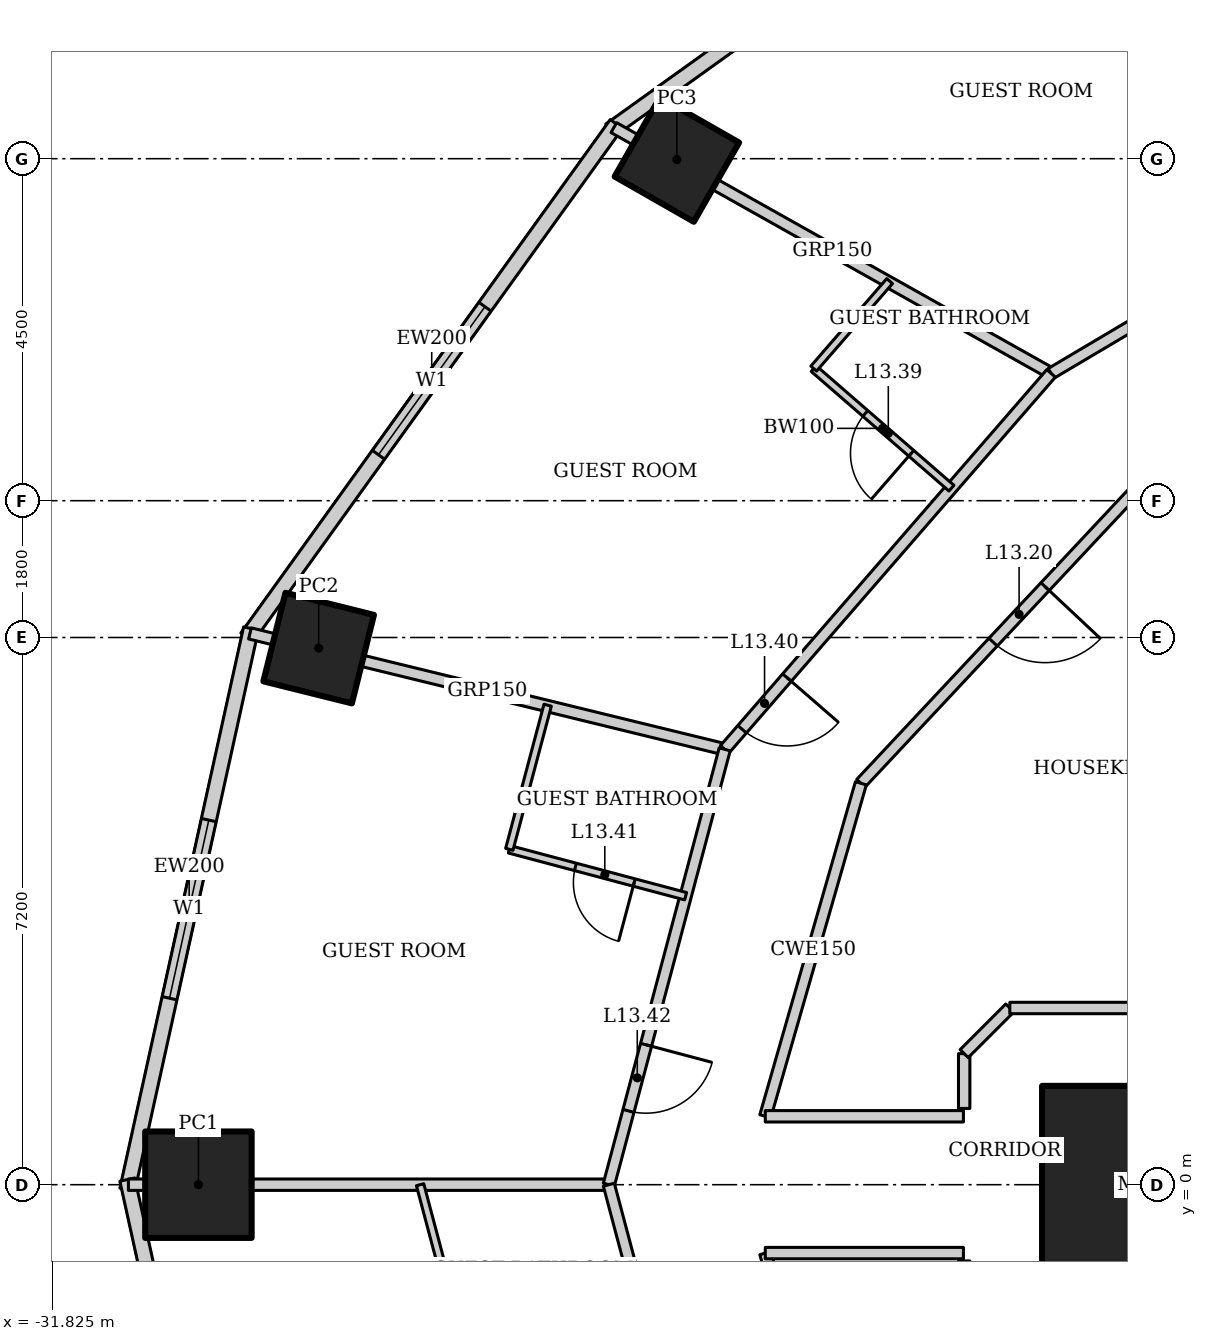
"""IFC4 building model, lengths in metres.
Left out: names, types, materials, properties, quantities, classifications, styles, units other than length and angle.
Written with IfcOpenShell. Run it as: python <this file> out.ifc"""

import sys

from ifc_helpers import new_model, si_unit, direction, frame, frame_2d, origin, origin_2d, place, context, subcontext, project, spatial, rectangle, hollow_rectangle, extrude, element, fill, save


model = new_model("IFC4")
c1 = context("Model", 3, precision=1e-05, world=origin(), true_north=direction((0.0, 1.0)))
c2 = subcontext(c1, "Body", "Model", "MODEL_VIEW")
j1 = project(units=[si_unit("LENGTHUNIT", "METRE"), si_unit("PLANEANGLEUNIT", "RADIAN")], contexts=[c1])
p1 = place(None, origin())
s1 = spatial("IfcSite", under=j1, at=p1, CompositionType="ELEMENT")
p2 = place(p1, origin())
s2 = spatial("IfcBuilding", under=s1, at=p2, CompositionType="ELEMENT")
p3 = place(p2, frame((0.0, 0.0, 62.2)))
s3 = spatial("IfcBuildingStorey", under=s2, at=p3, CompositionType="ELEMENT", Elevation=62.2)
p4 = place(p3, frame((-17.5, 0.0, 0.0), z_axis=(0.0, 0.0, 1.0), x_axis=(1.0, 0.0, 0.0)))
e1 = element("IfcColumn", 1, at=p4, inside=s3, PredefinedType="COLUMN", context=c2, shape_type="SweptSolid", body=[
    extrude(hollow_rectangle(XDim=2.6, YDim=2.6, WallThickness=0.13, at=origin_2d()), origin(), (0.0, 0.0, 1.0), 3.6),
])
p5 = place(p3, frame((-23.605, 13.489, 0.0), z_axis=(0.0, 0.0, 1.0), x_axis=(0.496139221777, 0.86824298017, 0.0)))
e2 = element("IfcColumn", 2, at=p5, inside=s3, PredefinedType="COLUMN", context=c2, shape_type="SweptSolid", body=[
    extrude(hollow_rectangle(XDim=1.2, YDim=1.2, WallThickness=0.12, at=origin_2d()), origin(), (0.0, 0.0, 1.0), 3.6),
])
p6 = place(p3, frame((-28.318, 7.06, 0.0), z_axis=(0.0, 0.0, 1.0), x_axis=(0.2419218956, 0.970295726276, 0.0)))
e3 = element("IfcColumn", 3, at=p6, inside=s3, PredefinedType="COLUMN", context=c2, shape_type="SweptSolid", body=[
    extrude(hollow_rectangle(XDim=1.2, YDim=1.2, WallThickness=0.1, at=origin_2d()), origin(), (0.0, 0.0, 1.0), 3.6),
])
p7 = place(p3, frame((-29.9, 0.0, 0.0), z_axis=(0.0, 0.0, 1.0), x_axis=(1.0, 0.0, 0.0)))
e4 = element("IfcColumn", 4, at=p7, inside=s3, PredefinedType="COLUMN", context=c2, shape_type="SweptSolid", body=[
    extrude(hollow_rectangle(XDim=1.4, YDim=1.4, WallThickness=0.1, at=origin_2d()), origin(), (0.0, 0.0, 1.0), 3.6),
])
p8 = place(p3, frame((-17.929, 18.572, 0.0), z_axis=(0.0, 0.0, 1.0), x_axis=(-0.812791321576, -0.582554948112, 0.0)))
e5 = element("IfcWall", 5, at=p8, inside=s3, PredefinedType="SOLIDWALL", context=c2, shape_type="SweptSolid", body=[
    extrude(rectangle(XDim=8.063, YDim=0.2, at=frame_2d((4.032, 0.0))), origin(), (0.0, 0.0, 1.0), 3.45),
])
p9 = place(p8, frame((2.832, 0.0, 0.5)))
e6 = element("IfcOpeningElement", 6, at=p9, cuts=e5, PredefinedType="OPENING", context=c2, shape_type="SweptSolid", body=[
    extrude(rectangle(XDim=2.4, YDim=2.2, at=frame_2d((1.2, 1.1))), frame((0.0, 0.11, 0.0), z_axis=(0.0, -1.0, 0.0), x_axis=(1.0, 0.0, 0.0)), (0.0, 0.0, 1.0), 0.22),
])
p10 = place(p3, frame((-24.4, 13.957, 0.0), z_axis=(0.0, 0.0, 1.0), x_axis=(-0.583937613703, -0.811798536155, 0.0)))
e7 = element("IfcWall", 7, at=p10, inside=s3, PredefinedType="SOLIDWALL", context=c2, shape_type="SweptSolid", body=[
    extrude(rectangle(XDim=8.323, YDim=0.2, at=frame_2d((4.162, 0.0))), origin(), (0.0, 0.0, 1.0), 3.45),
])
p11 = place(p10, frame((2.961, 0.0, 0.5)))
e8 = element("IfcOpeningElement", 8, at=p11, cuts=e7, PredefinedType="OPENING", context=c2, shape_type="SweptSolid", body=[
    extrude(rectangle(XDim=2.4, YDim=2.2, at=frame_2d((1.2, 1.1))), frame((0.0, 0.11, 0.0), z_axis=(0.0, -1.0, 0.0), x_axis=(1.0, 0.0, 0.0)), (0.0, 0.0, 1.0), 0.22),
])
p12 = place(p3, frame((-29.208, 7.318, 0.0), z_axis=(0.0, 0.0, 1.0), x_axis=(-0.215238065514, -0.976561608478, 0.0)))
e9 = element("IfcWall", 9, at=p12, inside=s3, PredefinedType="SOLIDWALL", context=c2, shape_type="SweptSolid", body=[
    extrude(rectangle(XDim=7.562, YDim=0.2, at=frame_2d((3.781, 0.0))), origin(), (0.0, 0.0, 1.0), 3.45),
])
p13 = place(p12, frame((2.581, 0.0, 0.5)))
e10 = element("IfcOpeningElement", 10, at=p13, cuts=e9, PredefinedType="OPENING", context=c2, shape_type="SweptSolid", body=[
    extrude(rectangle(XDim=2.4, YDim=2.2, at=frame_2d((1.2, 1.1))), frame((0.0, 0.11, 0.0), z_axis=(0.0, -1.0, 0.0), x_axis=(1.0, 0.0, 0.0)), (0.0, 0.0, 1.0), 0.22),
])
p14 = place(p3, frame((-30.835, 0.067, 0.0), z_axis=(0.0, 0.0, 1.0), x_axis=(0.215238065514, -0.976561608478, 0.0)))
e11 = element("IfcWall", 11, at=p14, inside=s3, PredefinedType="SOLIDWALL", context=c2, shape_type="SweptSolid", body=[
    extrude(rectangle(XDim=7.562, YDim=0.2, at=frame_2d((3.781, 0.0))), origin(), (0.0, 0.0, 1.0), 3.45),
])
p15 = place(p14, frame((2.581, 0.0, 0.5)))
e12 = element("IfcOpeningElement", 12, at=p15, cuts=e11, PredefinedType="OPENING", context=c2, shape_type="SweptSolid", body=[
    extrude(rectangle(XDim=2.4, YDim=2.2, at=frame_2d((1.2, 1.1))), frame((0.0, 0.11, 0.0), z_axis=(0.0, -1.0, 0.0), x_axis=(1.0, 0.0, 0.0)), (0.0, 0.0, 1.0), 0.22),
])
p16 = place(p3, frame((-17.97, 18.542, 0.0), z_axis=(0.0, 0.0, 1.0), x_axis=(0.699736251994, -0.714401272147, 0.0)))
e13 = element("IfcWall", 13, at=p16, inside=s3, PredefinedType="PARTITIONING", context=c2, shape_type="SweptSolid", body=[
    extrude(rectangle(XDim=6.593, YDim=0.15, at=frame_2d((3.296, 0.0))), origin(), (0.0, 0.0, 1.0), 2.528),
])
p17 = place(p3, frame((-24.435, 13.909, 0.0), z_axis=(0.0, 0.0, 1.0), x_axis=(0.871747379892, -0.489955616001, 0.0)))
e14 = element("IfcWall", 14, at=p17, inside=s3, PredefinedType="PARTITIONING", context=c2, shape_type="SweptSolid", body=[
    extrude(rectangle(XDim=6.6, YDim=0.15, at=frame_2d((3.3, 0.0))), origin(), (0.0, 0.0, 1.0), 2.693),
])
p18 = place(p3, frame((-29.222, 7.254, 0.0), z_axis=(0.0, 0.0, 1.0), x_axis=(0.971456980633, -0.237215797913, 0.0)))
e15 = element("IfcWall", 15, at=p18, inside=s3, PredefinedType="PARTITIONING", context=c2, shape_type="SweptSolid", body=[
    extrude(rectangle(XDim=6.429, YDim=0.15, at=frame_2d((3.215, 0.0))), origin(), (0.0, 0.0, 1.0), 2.333),
])
p19 = place(p3, frame((-30.821, 0.0, 0.0), z_axis=(0.0, 0.0, 1.0), x_axis=(1.0, 0.0, 0.0)))
e16 = element("IfcWall", 16, at=p19, inside=s3, PredefinedType="PARTITIONING", context=c2, shape_type="SweptSolid", body=[
    extrude(rectangle(XDim=6.321, YDim=0.15, at=frame_2d((3.16, 0.0))), origin(), (0.0, 0.0, 1.0), 2.528),
])
p20 = place(p3, frame((-13.357, 13.832, 0.0), z_axis=(0.0, 0.0, 1.0), x_axis=(-0.860147339762, -0.510045639036, 0.0)))
e17 = element("IfcWall", 17, at=p20, inside=s3, PredefinedType="PARTITIONING", context=c2, shape_type="SweptSolid", body=[
    extrude(rectangle(XDim=6.19, YDim=0.15, at=frame_2d((3.095, 0.0))), origin(), (0.0, 0.0, 1.0), 3.45),
])
p21 = place(p20, frame((2.708, 0.0, 0.0)))
e18 = element("IfcOpeningElement", 18, at=p21, cuts=e17, PredefinedType="OPENING", context=c2, shape_type="SweptSolid", body=[
    extrude(rectangle(XDim=0.9, YDim=2.1, at=frame_2d((0.45, 1.05))), frame((0.0, 0.085, 0.0), z_axis=(0.0, -1.0, 0.0), x_axis=(1.0, 0.0, 0.0)), (0.0, 0.0, 1.0), 0.17),
])
p22 = place(p3, frame((-18.681, 10.675, 0.0), z_axis=(0.0, 0.0, 1.0), x_axis=(-0.655599989166, -0.755108372491, 0.0)))
e19 = element("IfcWall", 19, at=p22, inside=s3, PredefinedType="PARTITIONING", context=c2, shape_type="SweptSolid", body=[
    extrude(rectangle(XDim=6.551, YDim=0.15, at=frame_2d((3.275, 0.0))), origin(), (0.0, 0.0, 1.0), 3.45),
])
p23 = place(p22, frame((5.301, 0.0, 0.0)))
e20 = element("IfcOpeningElement", 20, at=p23, cuts=e19, PredefinedType="OPENING", context=c2, shape_type="SweptSolid", body=[
    extrude(rectangle(XDim=0.9, YDim=2.1, at=frame_2d((0.45, 1.05))), frame((0.0, 0.085, 0.0), z_axis=(0.0, -1.0, 0.0), x_axis=(1.0, 0.0, 0.0)), (0.0, 0.0, 1.0), 0.17),
])
p24 = place(p3, frame((-22.976, 5.729, 0.0), z_axis=(0.0, 0.0, 1.0), x_axis=(-0.257083265334, -0.966389256296, 0.0)))
e21 = element("IfcWall", 21, at=p24, inside=s3, PredefinedType="PARTITIONING", context=c2, shape_type="SweptSolid", body=[
    extrude(rectangle(XDim=5.928, YDim=0.15, at=frame_2d((2.964, 0.0))), origin(), (0.0, 0.0, 1.0), 3.45),
])
p25 = place(p24, frame((4.023, 0.0, 0.0)))
e22 = element("IfcOpeningElement", 22, at=p25, cuts=e21, PredefinedType="OPENING", context=c2, shape_type="SweptSolid", body=[
    extrude(rectangle(XDim=0.9, YDim=2.1, at=frame_2d((0.45, 1.05))), frame((0.0, 0.085, 0.0), z_axis=(0.0, -1.0, 0.0), x_axis=(1.0, 0.0, 0.0)), (0.0, 0.0, 1.0), 0.17),
])
p26 = place(p3, frame((-24.5, 0.0, 0.0), z_axis=(0.0, 0.0, 1.0), x_axis=(0.257083265334, -0.966389256296, 0.0)))
e23 = element("IfcWall", 23, at=p26, inside=s3, PredefinedType="PARTITIONING", context=c2, shape_type="SweptSolid", body=[
    extrude(rectangle(XDim=5.928, YDim=0.15, at=frame_2d((2.964, 0.0))), origin(), (0.0, 0.0, 1.0), 3.45),
])
p27 = place(p26, frame((2.1, 0.0, 0.0)))
e24 = element("IfcOpeningElement", 24, at=p27, cuts=e23, PredefinedType="OPENING", context=c2, shape_type="SweptSolid", body=[
    extrude(rectangle(XDim=0.9, YDim=2.1, at=frame_2d((0.45, 1.05))), frame((0.0, 0.085, 0.0), z_axis=(0.0, -1.0, 0.0), x_axis=(1.0, 0.0, 0.0)), (0.0, 0.0, 1.0), 0.17),
])
p28 = place(p3, frame((-17.021, 9.726, 0.0), z_axis=(0.0, 0.0, 1.0), x_axis=(-0.68365836236, -0.729802194828, 0.0)))
e25 = element("IfcWall", 25, at=p28, inside=s3, PredefinedType="PARTITIONING", context=c2, shape_type="SweptSolid", body=[
    extrude(rectangle(XDim=6.09, YDim=0.15, at=frame_2d((3.045, 0.0))), origin(), (0.0, 0.0, 1.0), 3.45),
])
p29 = place(p28, frame((2.545, 0.0, 0.0)))
e26 = element("IfcOpeningElement", 26, at=p29, cuts=e25, PredefinedType="OPENING", context=c2, shape_type="SweptSolid", body=[
    extrude(rectangle(XDim=1.0, YDim=2.1, at=frame_2d((0.5, 1.05))), frame((0.0, 0.085, 0.0), z_axis=(0.0, -1.0, 0.0), x_axis=(1.0, 0.0, 0.0)), (0.0, 0.0, 1.0), 0.17),
])
for number, where, z_axis, x_axis in (
    (27, (-21.184, 5.282, 0.0), (0.0, 0.0, 1.0), (-0.276, -0.961, 0.0)),
    (28, (-22.442, -0.9, 0.0), (0.0, 0.0, 1.0), (0.276, -0.961, 0.0)),
):
    element("IfcWall", number, at=place(p3, frame(where, z_axis=z_axis, x_axis=x_axis)), inside=s3, PredefinedType="PARTITIONING", context=c2, shape_type="SweptSolid", body=[
        extrude(rectangle(XDim=4.559, YDim=0.15, at=frame_2d((2.279, 0.0))), origin(), (0.0, 0.0, 1.0), 3.45),
    ])
p30 = place(p3, frame((-19.993, 9.165, 0.0), z_axis=(0.0, 0.0, 1.0), x_axis=(-0.755098052661, 0.655611875172, 0.0)))
e29 = element("IfcWall", 29, at=p30, inside=s3, PredefinedType="PARTITIONING", context=c2, shape_type="SweptSolid", body=[
    extrude(rectangle(XDim=2.4, YDim=0.1, at=frame_2d((1.2, 0.0))), origin(), (0.0, 0.0, 1.0), 3.45),
])
p31 = place(p30, frame((0.7, 0.0, 0.0)))
e30 = element("IfcOpeningElement", 30, at=p31, cuts=e29, PredefinedType="OPENING", context=c2, shape_type="SweptSolid", body=[
    extrude(rectangle(XDim=0.8, YDim=2.1, at=frame_2d((0.4, 1.05))), frame((0.0, 0.06, 0.0), z_axis=(0.0, -1.0, 0.0), x_axis=(1.0, 0.0, 0.0)), (0.0, 0.0, 1.0), 0.12),
])
p32 = place(p3, frame((-21.805, 10.738, 0.0), z_axis=(0.0, 0.0, 1.0), x_axis=(0.655528024617, 0.755170847518, 0.0)))
e31 = element("IfcWall", 31, at=p32, inside=s3, PredefinedType="PARTITIONING", context=c2, shape_type="SweptSolid", body=[
    extrude(rectangle(XDim=1.524, YDim=0.1, at=frame_2d((0.762, 0.0))), origin(), (0.0, 0.0, 1.0), 3.45),
])
p33 = place(p3, frame((-23.49, 3.796, 0.0), z_axis=(0.0, 0.0, 1.0), x_axis=(-0.96639514992, 0.257061109879, 0.0)))
e32 = element("IfcWall", 32, at=p33, inside=s3, PredefinedType="PARTITIONING", context=c2, shape_type="SweptSolid", body=[
    extrude(rectangle(XDim=2.4, YDim=0.1, at=frame_2d((1.2, 0.0))), origin(), (0.0, 0.0, 1.0), 3.45),
])
p34 = place(p33, frame((0.7, 0.0, 0.0)))
e33 = element("IfcOpeningElement", 33, at=p34, cuts=e32, PredefinedType="OPENING", context=c2, shape_type="SweptSolid", body=[
    extrude(rectangle(XDim=0.8, YDim=2.1, at=frame_2d((0.4, 1.05))), frame((0.0, 0.06, 0.0), z_axis=(0.0, -1.0, 0.0), x_axis=(1.0, 0.0, 0.0)), (0.0, 0.0, 1.0), 0.12),
])
p35 = place(p3, frame((-25.81, 4.413, 0.0), z_axis=(0.0, 0.0, 1.0), x_axis=(0.257143831715, 0.96637314212, 0.0)))
e34 = element("IfcWall", 34, at=p35, inside=s3, PredefinedType="PARTITIONING", context=c2, shape_type="SweptSolid", body=[
    extrude(rectangle(XDim=1.962, YDim=0.1, at=frame_2d((0.981, 0.0))), origin(), (0.0, 0.0, 1.0), 3.45),
])
p36 = place(p3, frame((-26.305, -2.55, 0.0), z_axis=(0.0, 0.0, 1.0), x_axis=(-0.257052122515, 0.966397540513, 0.0)))
e35 = element("IfcWall", 35, at=p36, inside=s3, PredefinedType="PARTITIONING", context=c2, shape_type="SweptSolid", body=[
    extrude(rectangle(XDim=2.638, YDim=0.1, at=frame_2d((1.319, 0.0))), origin(), (0.0, 0.0, 1.0), 3.45),
])
for number, where, z_axis, x_axis in (
    (36, (-19.835, -0.9, 0.0), (0.0, 0.0, 1.0), (-1.0, 0.0, 0.0)),
    (37, (-19.835, 0.9, 0.0), (0.0, 0.0, 1.0), (-1.0, 0.0, 0.0)),
):
    element("IfcWall", number, at=place(p3, frame(where, z_axis=z_axis, x_axis=x_axis)), inside=s3, PredefinedType="PARTITIONING", context=c2, shape_type="SweptSolid", body=[
        extrude(rectangle(XDim=2.607, YDim=0.15, at=frame_2d((1.303, 0.0))), origin(), (0.0, 0.0, 1.0), 3.45),
    ])
p37 = place(p3, frame((-19.825, 1.003, 0.0), z_axis=(0.0, 0.0, 1.0), x_axis=(0.0, 1.0, 0.0)))
e38 = element("IfcWall", 38, at=p37, inside=s3, PredefinedType="PARTITIONING", context=c2, shape_type="SweptSolid", body=[
    extrude(rectangle(XDim=0.721, YDim=0.15, at=frame_2d((0.361, 0.0))), origin(), (0.0, 0.0, 1.0), 3.45),
])
p38 = place(p3, frame((-19.825, 1.725, 0.0), z_axis=(0.0, 0.0, 1.0), x_axis=(0.707106781187, 0.707106781187, 0.0)))
e39 = element("IfcWall", 39, at=p38, inside=s3, PredefinedType="PARTITIONING", context=c2, shape_type="SweptSolid", body=[
    extrude(rectangle(XDim=0.849, YDim=0.15, at=frame_2d((0.425, 0.0))), origin(), (0.0, 0.0, 1.0), 3.45),
])
p39 = place(p3, frame((-19.225, 2.325, 0.0), z_axis=(0.0, 0.0, 1.0), x_axis=(1.0, 0.0, 0.0)))
e40 = element("IfcWall", 40, at=p39, inside=s3, PredefinedType="PARTITIONING", context=c2, shape_type="SweptSolid", body=[
    extrude(rectangle(XDim=3.449, YDim=0.15, at=frame_2d((1.725, 0.0))), origin(), (0.0, 0.0, 1.0), 3.45),
])
p40 = place(p11, origin())
e41 = element("IfcWindow", 41, at=p40, inside=s3, PartitioningType="SINGLE_PANEL", PredefinedType="WINDOW", context=c2, shape_type="SweptSolid", body=[
    extrude(rectangle(XDim=2.4, YDim=2.2, at=frame_2d((1.2, 1.1))), frame((0.0, 0.03, 0.0), z_axis=(0.0, -1.0, 0.0), x_axis=(1.0, 0.0, 0.0)), (0.0, 0.0, 1.0), 0.06),
])
fill(e8, e41)
p41 = place(p13, origin())
e42 = element("IfcWindow", 42, at=p41, inside=s3, PartitioningType="SINGLE_PANEL", PredefinedType="WINDOW", context=c2, shape_type="SweptSolid", body=[
    extrude(rectangle(XDim=2.4, YDim=2.2, at=frame_2d((1.2, 1.1))), frame((0.0, 0.03, 0.0), z_axis=(0.0, -1.0, 0.0), x_axis=(1.0, 0.0, 0.0)), (0.0, 0.0, 1.0), 0.06),
])
fill(e10, e42)
p42 = place(p29, origin())
e43 = element("IfcDoor", 43, at=p42, inside=s3, OperationType="SINGLE_SWING_LEFT", PredefinedType="DOOR", context=c2, shape_type="SweptSolid", body=[
    extrude(rectangle(XDim=1.0, YDim=2.1, at=frame_2d((0.5, 1.05))), frame((0.0, 0.025, 0.0), z_axis=(0.0, -1.0, 0.0), x_axis=(1.0, 0.0, 0.0)), (0.0, 0.0, 1.0), 0.05),
])
fill(e26, e43)
p43 = place(p31, origin())
e44 = element("IfcDoor", 44, at=p43, inside=s3, OperationType="SINGLE_SWING_LEFT", PredefinedType="DOOR", context=c2, shape_type="SweptSolid", body=[
    extrude(rectangle(XDim=0.8, YDim=2.1, at=frame_2d((0.4, 1.05))), frame((0.0, 0.025, 0.0), z_axis=(0.0, -1.0, 0.0), x_axis=(1.0, 0.0, 0.0)), (0.0, 0.0, 1.0), 0.05),
])
fill(e30, e44)
p44 = place(p23, origin())
e45 = element("IfcDoor", 45, at=p44, inside=s3, OperationType="SINGLE_SWING_LEFT", PredefinedType="DOOR", context=c2, shape_type="SweptSolid", body=[
    extrude(rectangle(XDim=0.9, YDim=2.1, at=frame_2d((0.45, 1.05))), frame((0.0, 0.025, 0.0), z_axis=(0.0, -1.0, 0.0), x_axis=(1.0, 0.0, 0.0)), (0.0, 0.0, 1.0), 0.05),
])
fill(e20, e45)
p45 = place(p34, origin())
e46 = element("IfcDoor", 46, at=p45, inside=s3, OperationType="SINGLE_SWING_LEFT", PredefinedType="DOOR", context=c2, shape_type="SweptSolid", body=[
    extrude(rectangle(XDim=0.8, YDim=2.1, at=frame_2d((0.4, 1.05))), frame((0.0, 0.025, 0.0), z_axis=(0.0, -1.0, 0.0), x_axis=(1.0, 0.0, 0.0)), (0.0, 0.0, 1.0), 0.05),
])
fill(e33, e46)
p46 = place(p25, origin())
e47 = element("IfcDoor", 47, at=p46, inside=s3, OperationType="SINGLE_SWING_LEFT", PredefinedType="DOOR", context=c2, shape_type="SweptSolid", body=[
    extrude(rectangle(XDim=0.9, YDim=2.1, at=frame_2d((0.45, 1.05))), frame((0.0, 0.025, 0.0), z_axis=(0.0, -1.0, 0.0), x_axis=(1.0, 0.0, 0.0)), (0.0, 0.0, 1.0), 0.05),
])
fill(e22, e47)
save(model, sys.argv[1])
